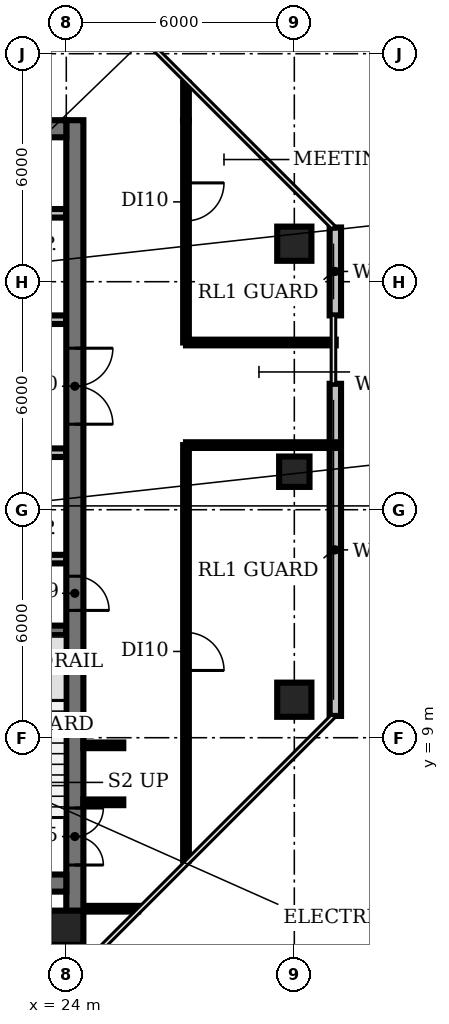
"""IFC4 building model, lengths in metres.
Left out: names, types, materials, properties, quantities, classifications, styles, units other than length and angle.
Written with IfcOpenShell. Run it as: python <this file> out.ifc"""

import sys

from ifc_helpers import new_model, si_unit, direction, frame, frame_2d, origin, origin_2d, place, context, subcontext, project, spatial, rectangle, circle, extrude, element, fill, save


model = new_model("IFC4")
c1 = context("Model", 3, precision=1e-05, world=origin(), true_north=direction((0.0, 1.0)))
c2 = subcontext(c1, "Body", "Model", "MODEL_VIEW")
j1 = project(units=[si_unit("LENGTHUNIT", "METRE"), si_unit("PLANEANGLEUNIT", "RADIAN")], contexts=[c1])
p1 = place(None, origin())
s1 = spatial("IfcSite", under=j1, at=p1, CompositionType="ELEMENT")
p2 = place(p1, origin())
s2 = spatial("IfcBuilding", under=s1, at=p2, CompositionType="ELEMENT")
p3 = place(p2, frame((0.0, 0.0, 230.6)))
s3 = spatial("IfcBuildingStorey", under=s2, at=p3, CompositionType="ELEMENT", Elevation=230.6)
for number, where, z_axis, x_axis in (
    (1, (24.0, 4.0, 0.0), (0.0, 0.0, 1.0), (1.0, 0.0, 0.0)),
    (2, (30.0, 10.0, 0.0), (0.0, 0.0, 1.0), (1.0, 0.0, 0.0)),
):
    element("IfcColumn", number, at=place(p3, frame(where, z_axis=z_axis, x_axis=x_axis)), inside=s3, PredefinedType="COLUMN", context=c2, shape_type="SweptSolid", body=[
        extrude(circle(Radius=0.45, at=origin_2d()), origin(), (0.0, 0.0, 1.0), 3.85),
    ])
p4 = place(p3, frame((30.0, 16.0, 0.0), z_axis=(0.0, 0.0, 1.0), x_axis=(1.0, 0.0, 0.0)))
e3 = element("IfcColumn", 3, at=p4, inside=s3, PredefinedType="COLUMN", context=c2, shape_type="SweptSolid", body=[
    extrude(rectangle(XDim=0.8, YDim=0.8, at=origin_2d()), origin(), (0.0, 0.0, 1.0), 3.85),
])
p5 = place(p3, frame((30.0, 22.0, 0.0), z_axis=(0.0, 0.0, 1.0), x_axis=(1.0, 0.0, 0.0)))
e4 = element("IfcColumn", 4, at=p5, inside=s3, PredefinedType="COLUMN", context=c2, shape_type="SweptSolid", body=[
    extrude(circle(Radius=0.45, at=origin_2d()), origin(), (0.0, 0.0, 1.0), 3.85),
])
p6 = place(p3, frame((31.08, 9.573, 0.0), z_axis=(0.0, 0.0, 1.0), x_axis=(0.0, 1.0, 0.0)))
e5 = element("IfcWall", 5, at=p6, inside=s3, PredefinedType="SOLIDWALL", context=c2, shape_type="SweptSolid", body=[
    extrude(rectangle(XDim=8.74, YDim=0.3, at=frame_2d((4.37, 0.0))), origin(), (0.0, 0.0, 1.0), 3.85),
])
p7 = place(p3, frame((31.08, 20.113, 0.0), z_axis=(0.0, 0.0, 1.0), x_axis=(0.0, 1.0, 0.0)))
e6 = element("IfcWall", 6, at=p7, inside=s3, PredefinedType="SOLIDWALL", context=c2, shape_type="SweptSolid", body=[
    extrude(rectangle(XDim=2.313, YDim=0.3, at=frame_2d((1.157, 0.0))), origin(), (0.0, 0.0, 1.0), 3.85),
])
p8 = place(p3, frame((20.85, 11.825, 0.0), z_axis=(0.0, 0.0, 1.0), x_axis=(1.0, 0.0, 0.0)))
e7 = element("IfcWall", 7, at=p8, inside=s3, PredefinedType="SHEAR", context=c2, shape_type="SweptSolid", body=[
    extrude(rectangle(XDim=3.15, YDim=0.25, at=frame_2d((1.575, 0.0))), origin(), (0.0, 0.0, 1.0), 3.85),
])
p9 = place(p3, frame((16.6, 13.7, 0.0), z_axis=(0.0, 0.0, 1.0), x_axis=(1.0, 0.0, 0.0)))
e8 = element("IfcWall", 8, at=p9, inside=s3, PredefinedType="PARTITIONING", context=c2, shape_type="SweptSolid", body=[
    extrude(rectangle(XDim=7.4, YDim=0.225, at=frame_2d((3.7, 0.0))), origin(), (0.0, 0.0, 1.0), 3.85),
])
p10 = place(p3, frame((9.4, 16.5, 0.0), z_axis=(0.0, 0.0, 1.0), x_axis=(1.0, 0.0, 0.0)))
e9 = element("IfcWall", 9, at=p10, inside=s3, PredefinedType="PARTITIONING", context=c2, shape_type="SweptSolid", body=[
    extrude(rectangle(XDim=14.6, YDim=0.225, at=frame_2d((7.3, 0.0))), origin(), (0.0, 0.0, 1.0), 3.85),
])
p11 = place(p10, frame((0.85, 0.0, 0.0)))
e10 = element("IfcOpeningElement", 10, at=p11, cuts=e9, PredefinedType="OPENING", context=c2, shape_type="SweptSolid", body=[
    extrude(rectangle(XDim=0.9, YDim=2.1, at=frame_2d((0.45, 1.05))), frame((0.0, 0.123, 0.0), z_axis=(0.0, -1.0, 0.0), x_axis=(1.0, 0.0, 0.0)), (0.0, 0.0, 1.0), 0.245),
])
p12 = place(p10, frame((3.625, 0.0, 0.0)))
e11 = element("IfcOpeningElement", 11, at=p12, cuts=e9, PredefinedType="OPENING", context=c2, shape_type="SweptSolid", body=[
    extrude(rectangle(XDim=0.9, YDim=2.1, at=frame_2d((0.45, 1.05))), frame((0.0, 0.123, 0.0), z_axis=(0.0, -1.0, 0.0), x_axis=(1.0, 0.0, 0.0)), (0.0, 0.0, 1.0), 0.245),
])
p13 = place(p10, frame((7.775, 0.0, 0.0)))
e12 = element("IfcOpeningElement", 12, at=p13, cuts=e9, PredefinedType="OPENING", context=c2, shape_type="SweptSolid", body=[
    extrude(rectangle(XDim=1.0, YDim=2.1, at=frame_2d((0.5, 1.05))), frame((0.0, 0.123, 0.0), z_axis=(0.0, -1.0, 0.0), x_axis=(1.0, 0.0, 0.0)), (0.0, 0.0, 1.0), 0.245),
])
p14 = place(p10, frame((12.4, 0.0, 0.0)))
e13 = element("IfcOpeningElement", 13, at=p14, cuts=e9, PredefinedType="OPENING", context=c2, shape_type="SweptSolid", body=[
    extrude(rectangle(XDim=1.0, YDim=2.1, at=frame_2d((0.5, 1.05))), frame((0.0, 0.123, 0.0), z_axis=(0.0, -1.0, 0.0), x_axis=(1.0, 0.0, 0.0)), (0.0, 0.0, 1.0), 0.245),
])
p15 = place(p3, frame((24.0, 20.0, 0.0), z_axis=(0.0, 0.0, 1.0), x_axis=(-1.0, 0.0, 0.0)))
e14 = element("IfcWall", 14, at=p15, inside=s3, PredefinedType="PARTITIONING", context=c2, shape_type="SweptSolid", body=[
    extrude(rectangle(XDim=14.6, YDim=0.225, at=frame_2d((7.3, 0.0))), origin(), (0.0, 0.0, 1.0), 3.85),
])
p16 = place(p15, frame((12.75, 0.0, 0.0)))
e15 = element("IfcOpeningElement", 15, at=p16, cuts=e14, PredefinedType="OPENING", context=c2, shape_type="SweptSolid", body=[
    extrude(rectangle(XDim=1.1, YDim=2.1, at=frame_2d((0.55, 1.05))), frame((0.0, 0.123, 0.0), z_axis=(0.0, -1.0, 0.0), x_axis=(1.0, 0.0, 0.0)), (0.0, 0.0, 1.0), 0.245),
])
p17 = place(p15, frame((9.95, 0.0, 0.0)))
e16 = element("IfcOpeningElement", 16, at=p17, cuts=e14, PredefinedType="OPENING", context=c2, shape_type="SweptSolid", body=[
    extrude(rectangle(XDim=1.1, YDim=2.1, at=frame_2d((0.55, 1.05))), frame((0.0, 0.123, 0.0), z_axis=(0.0, -1.0, 0.0), x_axis=(1.0, 0.0, 0.0)), (0.0, 0.0, 1.0), 0.245),
])
p18 = place(p15, frame((7.15, 0.0, 0.0)))
e17 = element("IfcOpeningElement", 17, at=p18, cuts=e14, PredefinedType="OPENING", context=c2, shape_type="SweptSolid", body=[
    extrude(rectangle(XDim=1.1, YDim=2.1, at=frame_2d((0.55, 1.05))), frame((0.0, 0.123, 0.0), z_axis=(0.0, -1.0, 0.0), x_axis=(1.0, 0.0, 0.0)), (0.0, 0.0, 1.0), 0.245),
])
p19 = place(p15, frame((4.35, 0.0, 0.0)))
e18 = element("IfcOpeningElement", 18, at=p19, cuts=e14, PredefinedType="OPENING", context=c2, shape_type="SweptSolid", body=[
    extrude(rectangle(XDim=1.1, YDim=2.1, at=frame_2d((0.55, 1.05))), frame((0.0, 0.123, 0.0), z_axis=(0.0, -1.0, 0.0), x_axis=(1.0, 0.0, 0.0)), (0.0, 0.0, 1.0), 0.245),
])
p20 = place(p15, frame((1.2, 0.0, 0.0)))
e19 = element("IfcOpeningElement", 19, at=p20, cuts=e14, PredefinedType="OPENING", context=c2, shape_type="SweptSolid", body=[
    extrude(rectangle(XDim=1.0, YDim=2.1, at=frame_2d((0.5, 1.05))), frame((0.0, 0.123, 0.0), z_axis=(0.0, -1.0, 0.0), x_axis=(1.0, 0.0, 0.0)), (0.0, 0.0, 1.0), 0.245),
])
p21 = place(p3, frame((9.4, 22.8, 0.0), z_axis=(0.0, 0.0, 1.0), x_axis=(1.0, 0.0, 0.0)))
e20 = element("IfcWall", 20, at=p21, inside=s3, PredefinedType="PARTITIONING", context=c2, shape_type="SweptSolid", body=[
    extrude(rectangle(XDim=14.6, YDim=0.225, at=frame_2d((7.3, 0.0))), origin(), (0.0, 0.0, 1.0), 3.85),
])
p22 = place(p3, frame((24.225, 25.25, 0.0), z_axis=(0.0, 0.0, 1.0), x_axis=(0.0, -1.0, 0.0)))
e21 = element("IfcWall", 21, at=p22, inside=s3, PredefinedType="SHEAR", context=c2, shape_type="SweptSolid", body=[
    extrude(rectangle(XDim=20.83, YDim=0.45, at=frame_2d((10.415, 0.0))), origin(), (0.0, 0.0, 1.0), 3.85),
])
p23 = place(p22, frame((18.1, 0.0, 0.0)))
e22 = element("IfcOpeningElement", 22, at=p23, cuts=e21, PredefinedType="OPENING", context=c2, shape_type="SweptSolid", body=[
    extrude(rectangle(XDim=1.5, YDim=2.1, at=frame_2d((0.75, 1.05))), frame((0.0, 0.235, 0.0), z_axis=(0.0, -1.0, 0.0), x_axis=(1.0, 0.0, 0.0)), (0.0, 0.0, 1.0), 0.47),
])
p24 = place(p22, frame((12.0, 0.0, 0.0)))
e23 = element("IfcOpeningElement", 23, at=p24, cuts=e21, PredefinedType="OPENING", context=c2, shape_type="SweptSolid", body=[
    extrude(rectangle(XDim=0.9, YDim=2.1, at=frame_2d((0.45, 1.05))), frame((0.0, 0.235, 0.0), z_axis=(0.0, -1.0, 0.0), x_axis=(1.0, 0.0, 0.0)), (0.0, 0.0, 1.0), 0.47),
])
p25 = place(p22, frame((6.0, 0.0, 0.0)))
e24 = element("IfcOpeningElement", 24, at=p25, cuts=e21, PredefinedType="OPENING", context=c2, shape_type="SweptSolid", body=[
    extrude(rectangle(XDim=2.0, YDim=2.1, at=frame_2d((1.0, 1.05))), frame((0.0, 0.235, 0.0), z_axis=(0.0, -1.0, 0.0), x_axis=(1.0, 0.0, 0.0)), (0.0, 0.0, 1.0), 0.47),
])
p26 = place(p3, frame((24.0, 5.175, 0.0), z_axis=(0.0, 0.0, 1.0), x_axis=(-1.0, 0.0, 0.0)))
e25 = element("IfcWall", 25, at=p26, inside=s3, PredefinedType="SHEAR", context=c2, shape_type="SweptSolid", body=[
    extrude(rectangle(XDim=18.0, YDim=0.45, at=frame_2d((9.0, 0.0))), origin(), (0.0, 0.0, 1.0), 3.85),
])
p27 = place(p26, frame((0.825, 0.0, 0.0)))
e26 = element("IfcOpeningElement", 26, at=p27, cuts=e25, PredefinedType="OPENING", context=c2, shape_type="SweptSolid", body=[
    extrude(rectangle(XDim=1.5, YDim=2.1, at=frame_2d((0.75, 1.05))), frame((0.0, 0.235, 0.0), z_axis=(0.0, -1.0, 0.0), x_axis=(1.0, 0.0, 0.0)), (0.0, 0.0, 1.0), 0.47),
])
p28 = place(p26, frame((15.675, 0.0, 0.0)))
e27 = element("IfcOpeningElement", 27, at=p28, cuts=e25, PredefinedType="OPENING", context=c2, shape_type="SweptSolid", body=[
    extrude(rectangle(XDim=1.5, YDim=2.1, at=frame_2d((0.75, 1.05))), frame((0.0, 0.235, 0.0), z_axis=(0.0, -1.0, 0.0), x_axis=(1.0, 0.0, 0.0)), (0.0, 0.0, 1.0), 0.47),
])
p29 = place(p26, frame((13.0, 0.0, 0.0)))
e28 = element("IfcOpeningElement", 28, at=p29, cuts=e25, PredefinedType="OPENING", context=c2, shape_type="SweptSolid", body=[
    extrude(rectangle(XDim=1.2, YDim=2.1, at=frame_2d((0.6, 1.05))), frame((0.0, 0.235, 0.0), z_axis=(0.0, -1.0, 0.0), x_axis=(1.0, 0.0, 0.0)), (0.0, 0.0, 1.0), 0.47),
])
p30 = place(p26, frame((4.4, 0.0, 0.0)))
e29 = element("IfcOpeningElement", 29, at=p30, cuts=e25, PredefinedType="OPENING", context=c2, shape_type="SweptSolid", body=[
    extrude(rectangle(XDim=1.0, YDim=2.1, at=frame_2d((0.5, 1.05))), frame((0.0, 0.235, 0.0), z_axis=(0.0, -1.0, 0.0), x_axis=(1.0, 0.0, 0.0)), (0.0, 0.0, 1.0), 0.47),
])
p31 = place(p3, frame((6.0, 25.025, 0.0), z_axis=(0.0, 0.0, 1.0), x_axis=(1.0, 0.0, 0.0)))
e30 = element("IfcWall", 30, at=p31, inside=s3, PredefinedType="SHEAR", context=c2, shape_type="SweptSolid", body=[
    extrude(rectangle(XDim=18.0, YDim=0.45, at=frame_2d((9.0, 0.0))), origin(), (0.0, 0.0, 1.0), 3.85),
])
for number, where, z_axis, x_axis in (
    (31, (24.45, 7.3, 0.0), (0.0, 0.0, 1.0), (1.0, 0.0, 0.0)),
    (32, (24.45, 8.8, 0.0), (0.0, 0.0, 1.0), (1.0, 0.0, 0.0)),
):
    element("IfcWall", number, at=place(p3, frame(where, z_axis=z_axis, x_axis=x_axis)), inside=s3, PredefinedType="PARTITIONING", context=c2, shape_type="SweptSolid", body=[
        extrude(rectangle(XDim=1.05, YDim=0.15, at=frame_2d((0.525, 0.0))), origin(), (0.0, 0.0, 1.0), 2.88),
    ])
p32 = place(p3, frame((24.55, 4.5, 0.0), z_axis=(0.0, 0.0, 1.0), x_axis=(1.0, 0.0, 0.0)))
e33 = element("IfcWall", 33, at=p32, inside=s3, PredefinedType="PARTITIONING", context=c2, shape_type="SweptSolid", body=[
    extrude(rectangle(XDim=1.34, YDim=0.15, at=frame_2d((0.67, 0.0))), origin(), (0.0, 0.0, 1.0), 2.88),
])
p33 = place(p3, frame((27.15, 16.7, 0.0), z_axis=(0.0, 0.0, 1.0), x_axis=(0.0, -1.0, 0.0)))
e34 = element("IfcWall", 34, at=p33, inside=s3, PredefinedType="PARTITIONING", context=c2, shape_type="SweptSolid", body=[
    extrude(rectangle(XDim=10.93, YDim=0.15, at=frame_2d((5.465, 0.0))), origin(), (0.0, 0.0, 1.0), 2.88),
])
p34 = place(p33, frame((4.93, 0.0, 0.0)))
e35 = element("IfcOpeningElement", 35, at=p34, cuts=e34, PredefinedType="OPENING", context=c2, shape_type="SweptSolid", body=[
    extrude(rectangle(XDim=1.0, YDim=2.1, at=frame_2d((0.5, 1.05))), frame((0.0, 0.085, 0.0), z_axis=(0.0, -1.0, 0.0), x_axis=(1.0, 0.0, 0.0)), (0.0, 0.0, 1.0), 0.17),
])
for number, where, z_axis, x_axis in (
    (36, (27.15, 16.7, 0.0), (0.0, 0.0, 1.0), (1.0, 0.0, 0.0)),
    (37, (27.15, 19.4, 0.0), (0.0, 0.0, 1.0), (1.0, 0.0, 0.0)),
):
    element("IfcWall", number, at=place(p3, frame(where, z_axis=z_axis, x_axis=x_axis)), inside=s3, PredefinedType="PARTITIONING", context=c2, shape_type="SweptSolid", body=[
        extrude(rectangle(XDim=3.94, YDim=0.15, at=frame_2d((1.97, 0.0))), origin(), (0.0, 0.0, 1.0), 2.88),
    ])
p35 = place(p3, frame((27.15, 25.25, 0.0), z_axis=(0.0, 0.0, 1.0), x_axis=(0.0, -1.0, 0.0)))
e38 = element("IfcWall", 38, at=p35, inside=s3, PredefinedType="PARTITIONING", context=c2, shape_type="SweptSolid", body=[
    extrude(rectangle(XDim=5.85, YDim=0.15, at=frame_2d((2.925, 0.0))), origin(), (0.0, 0.0, 1.0), 2.88),
])
p36 = place(p35, frame((1.65, 0.0, 0.0)))
e39 = element("IfcOpeningElement", 39, at=p36, cuts=e38, PredefinedType="OPENING", context=c2, shape_type="SweptSolid", body=[
    extrude(rectangle(XDim=1.0, YDim=2.1, at=frame_2d((0.5, 1.05))), frame((0.0, 0.085, 0.0), z_axis=(0.0, -1.0, 0.0), x_axis=(1.0, 0.0, 0.0)), (0.0, 0.0, 1.0), 0.17),
])
p37 = place(p3, frame((27.15, 25.25, 0.0), z_axis=(0.0, 0.0, 1.0), x_axis=(0.0, 1.0, 0.0)))
e40 = element("IfcWall", 40, at=p37, inside=s3, PredefinedType="PARTITIONING", context=c2, shape_type="SweptSolid", body=[
    extrude(rectangle(XDim=0.98, YDim=0.15, at=frame_2d((0.49, 0.0))), origin(), (0.0, 0.0, 1.0), 2.88),
])
p38 = place(p23, origin())
e41 = element("IfcDoor", 41, at=p38, inside=s3, OperationType="DOUBLE_DOOR_SINGLE_SWING", PredefinedType="DOOR", context=c2, shape_type="SweptSolid", body=[
    extrude(rectangle(XDim=1.5, YDim=2.1, at=frame_2d((0.75, 1.05))), frame((0.0, 0.025, 0.0), z_axis=(0.0, -1.0, 0.0), x_axis=(1.0, 0.0, 0.0)), (0.0, 0.0, 1.0), 0.05),
])
fill(e22, e41)
p39 = place(p24, origin())
e42 = element("IfcDoor", 42, at=p39, inside=s3, OperationType="SINGLE_SWING_RIGHT", PredefinedType="DOOR", context=c2, shape_type="SweptSolid", body=[
    extrude(rectangle(XDim=0.9, YDim=2.1, at=frame_2d((0.45, 1.05))), frame((0.0, 0.025, 0.0), z_axis=(0.0, -1.0, 0.0), x_axis=(1.0, 0.0, 0.0)), (0.0, 0.0, 1.0), 0.05),
])
fill(e23, e42)
p40 = place(p25, origin())
e43 = element("IfcDoor", 43, at=p40, inside=s3, OperationType="DOUBLE_DOOR_SINGLE_SWING", PredefinedType="DOOR", context=c2, shape_type="SweptSolid", body=[
    extrude(rectangle(XDim=2.0, YDim=2.1, at=frame_2d((1.0, 1.05))), frame((0.0, 0.025, 0.0), z_axis=(0.0, -1.0, 0.0), x_axis=(1.0, 0.0, 0.0)), (0.0, 0.0, 1.0), 0.05),
])
fill(e24, e43)
p41 = place(p34, origin())
e44 = element("IfcDoor", 44, at=p41, inside=s3, OperationType="SINGLE_SWING_RIGHT", PredefinedType="DOOR", context=c2, shape_type="SweptSolid", body=[
    extrude(rectangle(XDim=1.0, YDim=2.1, at=frame_2d((0.5, 1.05))), frame((0.0, 0.025, 0.0), z_axis=(0.0, -1.0, 0.0), x_axis=(1.0, 0.0, 0.0)), (0.0, 0.0, 1.0), 0.05),
])
fill(e35, e44)
p42 = place(p36, origin())
e45 = element("IfcDoor", 45, at=p42, inside=s3, OperationType="SINGLE_SWING_LEFT", PredefinedType="DOOR", context=c2, shape_type="SweptSolid", body=[
    extrude(rectangle(XDim=1.0, YDim=2.1, at=frame_2d((0.5, 1.05))), frame((0.0, 0.025, 0.0), z_axis=(0.0, -1.0, 0.0), x_axis=(1.0, 0.0, 0.0)), (0.0, 0.0, 1.0), 0.05),
])
fill(e39, e45)
save(model, sys.argv[1])
